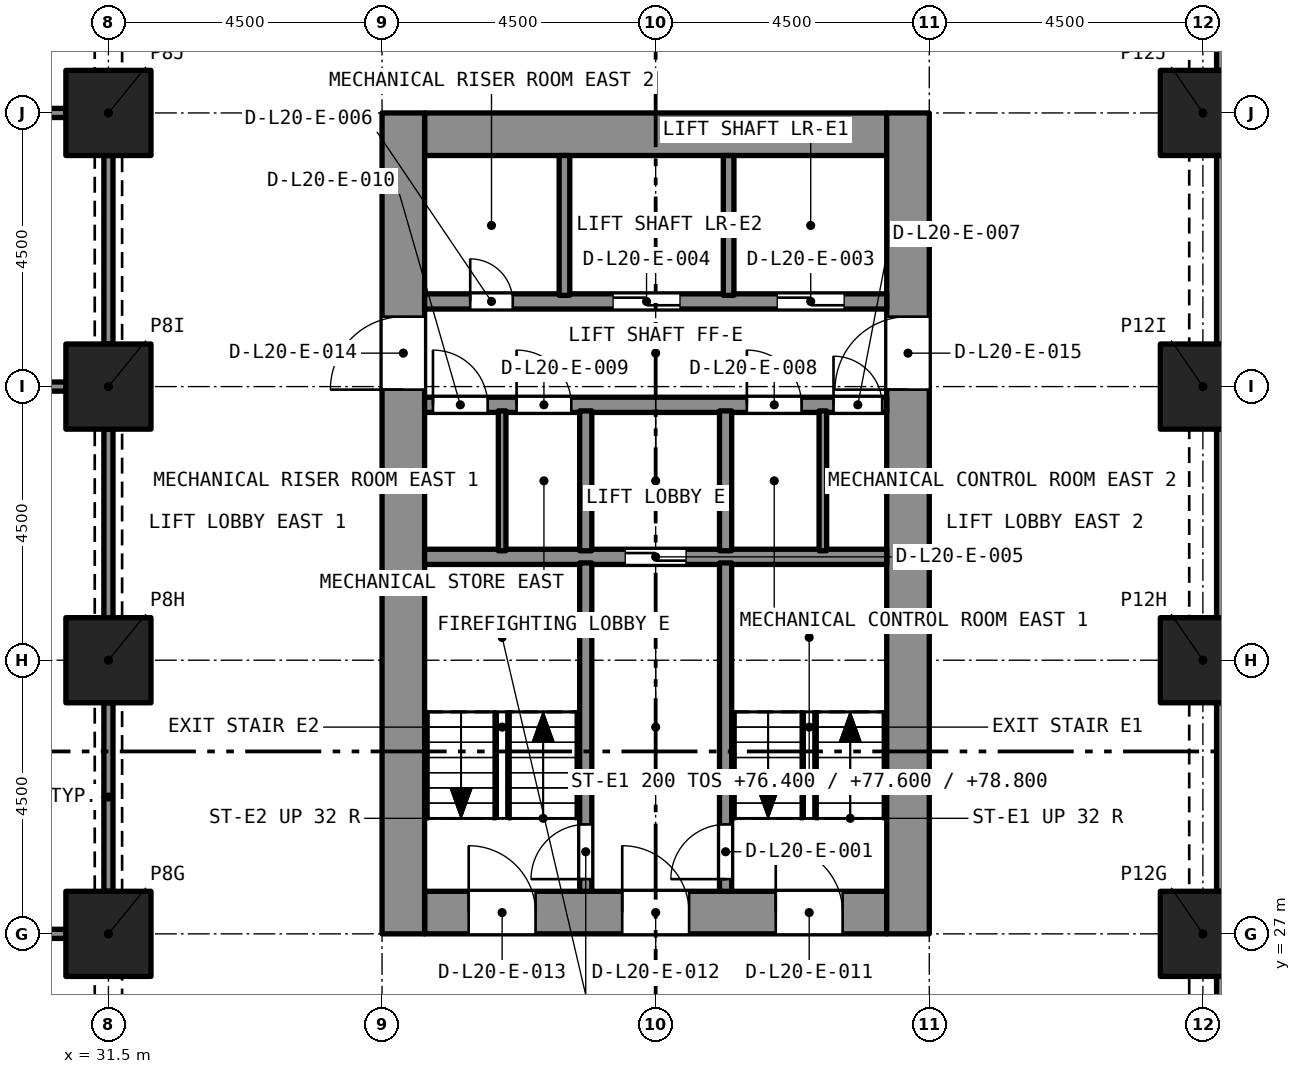
"""IFC4 building model, lengths in metres.
Left out: names, types, materials, properties, quantities, classifications, styles, units other than length and angle.
Written with IfcOpenShell. Run it as: python <this file> out.ifc"""

import sys

from ifc_helpers import new_model, si_unit, direction, frame, frame_2d, origin, origin_2d, place, context, subcontext, project, spatial, rectangle, extrude, element, fill, save


model = new_model("IFC4")
c1 = context("Model", 3, precision=1e-05, world=origin(), true_north=direction((0.0, 1.0)))
c2 = subcontext(c1, "Body", "Model", "MODEL_VIEW")
j1 = project(units=[si_unit("LENGTHUNIT", "METRE"), si_unit("PLANEANGLEUNIT", "RADIAN")], contexts=[c1])
p1 = place(None, origin())
s1 = spatial("IfcSite", under=j1, at=p1, CompositionType="ELEMENT")
p2 = place(p1, origin())
s2 = spatial("IfcBuilding", under=s1, at=p2, CompositionType="ELEMENT")
p3 = place(p2, frame((0.0, 0.0, 75.2)))
s3 = spatial("IfcBuildingStorey", under=s2, at=p3, CompositionType="ELEMENT", Elevation=75.2)
for number, where, z_axis, x_axis in (
    (1, (31.5, 27.0, 0.0), (0.0, 0.0, 1.0), (1.0, 0.0, 0.0)),
    (2, (49.5, 27.0, 0.0), (0.0, 0.0, 1.0), (1.0, 0.0, 0.0)),
    (3, (31.5, 31.5, 0.0), (0.0, 0.0, 1.0), (1.0, 0.0, 0.0)),
    (4, (49.5, 31.5, 0.0), (0.0, 0.0, 1.0), (1.0, 0.0, 0.0)),
    (5, (31.5, 36.0, 0.0), (0.0, 0.0, 1.0), (1.0, 0.0, 0.0)),
    (6, (49.5, 36.0, 0.0), (0.0, 0.0, 1.0), (1.0, 0.0, 0.0)),
    (7, (31.5, 40.5, 0.0), (0.0, 0.0, 1.0), (1.0, 0.0, 0.0)),
    (8, (49.5, 40.5, 0.0), (0.0, 0.0, 1.0), (1.0, 0.0, 0.0)),
):
    element("IfcColumn", number, at=place(p3, frame(where, z_axis=z_axis, x_axis=x_axis)), inside=s3, PredefinedType="COLUMN", context=c2, shape_type="SweptSolid", body=[
        extrude(rectangle(XDim=1.4, YDim=1.4, at=origin_2d()), origin(), (0.0, 0.0, 1.0), 4.8),
    ])
p4 = place(p3, frame((36.7, 27.35, 0.0), z_axis=(0.0, 0.0, 1.0), x_axis=(1.0, 0.0, 0.0)))
e9 = element("IfcWall", 9, at=p4, inside=s3, PredefinedType="SOLIDWALL", context=c2, shape_type="SweptSolid", body=[
    extrude(rectangle(XDim=7.6, YDim=0.7, at=frame_2d((3.8, 0.0))), origin(), (0.0, 0.0, 1.0), 4.8),
])
p5 = place(p4, frame((5.775, 0.0, 0.0)))
e10 = element("IfcOpeningElement", 10, at=p5, cuts=e9, PredefinedType="OPENING", context=c2, shape_type="SweptSolid", body=[
    extrude(rectangle(XDim=1.1, YDim=2.1, at=frame_2d((0.55, 1.05))), frame((0.0, 0.36, 0.0), z_axis=(0.0, -1.0, 0.0), x_axis=(1.0, 0.0, 0.0)), (0.0, 0.0, 1.0), 0.72),
])
p6 = place(p4, frame((3.25, 0.0, 0.0)))
e11 = element("IfcOpeningElement", 11, at=p6, cuts=e9, PredefinedType="OPENING", context=c2, shape_type="SweptSolid", body=[
    extrude(rectangle(XDim=1.1, YDim=2.1, at=frame_2d((0.55, 1.05))), frame((0.0, 0.36, 0.0), z_axis=(0.0, -1.0, 0.0), x_axis=(1.0, 0.0, 0.0)), (0.0, 0.0, 1.0), 0.72),
])
p7 = place(p4, frame((0.725, 0.0, 0.0)))
e12 = element("IfcOpeningElement", 12, at=p7, cuts=e9, PredefinedType="OPENING", context=c2, shape_type="SweptSolid", body=[
    extrude(rectangle(XDim=1.1, YDim=2.1, at=frame_2d((0.55, 1.05))), frame((0.0, 0.36, 0.0), z_axis=(0.0, -1.0, 0.0), x_axis=(1.0, 0.0, 0.0)), (0.0, 0.0, 1.0), 0.72),
])
p8 = place(p3, frame((36.7, 40.15, 0.0), z_axis=(0.0, 0.0, 1.0), x_axis=(1.0, 0.0, 0.0)))
e13 = element("IfcWall", 13, at=p8, inside=s3, PredefinedType="SOLIDWALL", context=c2, shape_type="SweptSolid", body=[
    extrude(rectangle(XDim=7.6, YDim=0.7, at=frame_2d((3.8, 0.0))), origin(), (0.0, 0.0, 1.0), 4.8),
])
p9 = place(p3, frame((36.35, 27.0, 0.0), z_axis=(0.0, 0.0, 1.0), x_axis=(0.0, 1.0, 0.0)))
e14 = element("IfcWall", 14, at=p9, inside=s3, PredefinedType="SOLIDWALL", context=c2, shape_type="SweptSolid", body=[
    extrude(rectangle(XDim=13.5, YDim=0.7, at=frame_2d((6.75, 0.0))), origin(), (0.0, 0.0, 1.0), 4.8),
])
p10 = place(p9, frame((8.95, 0.0, 0.0)))
e15 = element("IfcOpeningElement", 15, at=p10, cuts=e14, PredefinedType="OPENING", context=c2, shape_type="SweptSolid", body=[
    extrude(rectangle(XDim=1.2, YDim=2.1, at=frame_2d((0.6, 1.05))), frame((0.0, 0.36, 0.0), z_axis=(0.0, -1.0, 0.0), x_axis=(1.0, 0.0, 0.0)), (0.0, 0.0, 1.0), 0.72),
])
p11 = place(p3, frame((44.65, 27.0, 0.0), z_axis=(0.0, 0.0, 1.0), x_axis=(0.0, 1.0, 0.0)))
e16 = element("IfcWall", 16, at=p11, inside=s3, PredefinedType="SOLIDWALL", context=c2, shape_type="SweptSolid", body=[
    extrude(rectangle(XDim=13.5, YDim=0.7, at=frame_2d((6.75, 0.0))), origin(), (0.0, 0.0, 1.0), 4.8),
])
p12 = place(p11, frame((8.95, 0.0, 0.0)))
e17 = element("IfcOpeningElement", 17, at=p12, cuts=e16, PredefinedType="OPENING", context=c2, shape_type="SweptSolid", body=[
    extrude(rectangle(XDim=1.2, YDim=2.1, at=frame_2d((0.6, 1.05))), frame((0.0, 0.36, 0.0), z_axis=(0.0, -1.0, 0.0), x_axis=(1.0, 0.0, 0.0)), (0.0, 0.0, 1.0), 0.72),
])
for number, where, z_axis, x_axis in (
    (18, (49.875, 26.3, 0.0), (0.0, 0.0, 1.0), (0.0, -1.0, 0.0)),
    (19, (49.875, 30.8, 0.0), (0.0, 0.0, 1.0), (0.0, -1.0, 0.0)),
    (20, (49.875, 35.3, 0.0), (0.0, 0.0, 1.0), (0.0, -1.0, 0.0)),
    (21, (49.875, 39.8, 0.0), (0.0, 0.0, 1.0), (0.0, -1.0, 0.0)),
    (22, (49.875, 44.3, 0.0), (0.0, 0.0, 1.0), (0.0, -1.0, 0.0)),
):
    element("IfcWall", number, at=place(p3, frame(where, z_axis=z_axis, x_axis=x_axis)), inside=s3, PredefinedType="SOLIDWALL", context=c2, shape_type="SweptSolid", body=[
        extrude(rectangle(XDim=3.1, YDim=0.3, at=frame_2d((1.55, 0.0))), origin(), (0.0, 0.0, 1.0), 4.8),
    ])
p13 = place(p3, frame((36.7, 33.2, 0.0), z_axis=(0.0, 0.0, 1.0), x_axis=(1.0, 0.0, 0.0)))
e23 = element("IfcWall", 23, at=p13, inside=s3, PredefinedType="SOLIDWALL", context=c2, shape_type="SweptSolid", body=[
    extrude(rectangle(XDim=7.6, YDim=0.25, at=frame_2d((3.8, 0.0))), origin(), (0.0, 0.0, 1.0), 4.5),
])
p14 = place(p13, frame((3.3, 0.0, 0.0)))
e24 = element("IfcOpeningElement", 24, at=p14, cuts=e23, PredefinedType="OPENING", context=c2, shape_type="SweptSolid", body=[
    extrude(rectangle(XDim=1.0, YDim=2.1, at=frame_2d((0.5, 1.05))), frame((0.0, 0.135, 0.0), z_axis=(0.0, -1.0, 0.0), x_axis=(1.0, 0.0, 0.0)), (0.0, 0.0, 1.0), 0.27),
])
p15 = place(p3, frame((36.7, 35.7, 0.0), z_axis=(0.0, 0.0, 1.0), x_axis=(1.0, 0.0, 0.0)))
e25 = element("IfcWall", 25, at=p15, inside=s3, PredefinedType="SOLIDWALL", context=c2, shape_type="SweptSolid", body=[
    extrude(rectangle(XDim=7.6, YDim=0.25, at=frame_2d((3.8, 0.0))), origin(), (0.0, 0.0, 1.0), 4.5),
])
p16 = place(p15, frame((6.725, 0.0, 0.0)))
e26 = element("IfcOpeningElement", 26, at=p16, cuts=e25, PredefinedType="OPENING", context=c2, shape_type="SweptSolid", body=[
    extrude(rectangle(XDim=0.8, YDim=2.1, at=frame_2d((0.4, 1.05))), frame((0.0, 0.135, 0.0), z_axis=(0.0, -1.0, 0.0), x_axis=(1.0, 0.0, 0.0)), (0.0, 0.0, 1.0), 0.27),
])
p17 = place(p15, frame((5.3, 0.0, 0.0)))
e27 = element("IfcOpeningElement", 27, at=p17, cuts=e25, PredefinedType="OPENING", context=c2, shape_type="SweptSolid", body=[
    extrude(rectangle(XDim=0.9, YDim=2.1, at=frame_2d((0.45, 1.05))), frame((0.0, 0.135, 0.0), z_axis=(0.0, -1.0, 0.0), x_axis=(1.0, 0.0, 0.0)), (0.0, 0.0, 1.0), 0.27),
])
p18 = place(p15, frame((1.512, 0.0, 0.0)))
e28 = element("IfcOpeningElement", 28, at=p18, cuts=e25, PredefinedType="OPENING", context=c2, shape_type="SweptSolid", body=[
    extrude(rectangle(XDim=0.9, YDim=2.1, at=frame_2d((0.45, 1.05))), frame((0.0, 0.135, 0.0), z_axis=(0.0, -1.0, 0.0), x_axis=(1.0, 0.0, 0.0)), (0.0, 0.0, 1.0), 0.27),
])
p19 = place(p15, frame((0.137, 0.0, 0.0)))
e29 = element("IfcOpeningElement", 29, at=p19, cuts=e25, PredefinedType="OPENING", context=c2, shape_type="SweptSolid", body=[
    extrude(rectangle(XDim=0.9, YDim=2.1, at=frame_2d((0.45, 1.05))), frame((0.0, 0.135, 0.0), z_axis=(0.0, -1.0, 0.0), x_axis=(1.0, 0.0, 0.0)), (0.0, 0.0, 1.0), 0.27),
])
p20 = place(p3, frame((36.7, 37.4, 0.0), z_axis=(0.0, 0.0, 1.0), x_axis=(1.0, 0.0, 0.0)))
e30 = element("IfcWall", 30, at=p20, inside=s3, PredefinedType="SOLIDWALL", context=c2, shape_type="SweptSolid", body=[
    extrude(rectangle(XDim=7.6, YDim=0.25, at=frame_2d((3.8, 0.0))), origin(), (0.0, 0.0, 1.0), 4.5),
])
p21 = place(p20, frame((5.8, 0.0, 0.0)))
e31 = element("IfcOpeningElement", 31, at=p21, cuts=e30, PredefinedType="OPENING", context=c2, shape_type="SweptSolid", body=[
    extrude(rectangle(XDim=1.1, YDim=2.4, at=frame_2d((0.55, 1.2))), frame((0.0, 0.135, 0.0), z_axis=(0.0, -1.0, 0.0), x_axis=(1.0, 0.0, 0.0)), (0.0, 0.0, 1.0), 0.27),
])
p22 = place(p20, frame((3.1, 0.0, 0.0)))
e32 = element("IfcOpeningElement", 32, at=p22, cuts=e30, PredefinedType="OPENING", context=c2, shape_type="SweptSolid", body=[
    extrude(rectangle(XDim=1.1, YDim=2.4, at=frame_2d((0.55, 1.2))), frame((0.0, 0.135, 0.0), z_axis=(0.0, -1.0, 0.0), x_axis=(1.0, 0.0, 0.0)), (0.0, 0.0, 1.0), 0.27),
])
p23 = place(p20, frame((0.75, 0.0, 0.0)))
e33 = element("IfcOpeningElement", 33, at=p23, cuts=e30, PredefinedType="OPENING", context=c2, shape_type="SweptSolid", body=[
    extrude(rectangle(XDim=0.7, YDim=2.1, at=frame_2d((0.35, 1.05))), frame((0.0, 0.135, 0.0), z_axis=(0.0, -1.0, 0.0), x_axis=(1.0, 0.0, 0.0)), (0.0, 0.0, 1.0), 0.27),
])
p24 = place(p3, frame((41.65, 27.7, 0.0), z_axis=(0.0, 0.0, 1.0), x_axis=(0.0, 1.0, 0.0)))
e34 = element("IfcWall", 34, at=p24, inside=s3, PredefinedType="SOLIDWALL", context=c2, shape_type="SweptSolid", body=[
    extrude(rectangle(XDim=5.4, YDim=0.2, at=frame_2d((2.7, 0.0))), origin(), (0.0, 0.0, 1.0), 4.5),
])
p25 = place(p24, frame((0.2, 0.0, 0.0)))
e35 = element("IfcOpeningElement", 35, at=p25, cuts=e34, PredefinedType="OPENING", context=c2, shape_type="SweptSolid", body=[
    extrude(rectangle(XDim=0.9, YDim=2.1, at=frame_2d((0.45, 1.05))), frame((0.0, 0.11, 0.0), z_axis=(0.0, -1.0, 0.0), x_axis=(1.0, 0.0, 0.0)), (0.0, 0.0, 1.0), 0.22),
])
p26 = place(p3, frame((39.35, 27.7, 0.0), z_axis=(0.0, 0.0, 1.0), x_axis=(0.0, 1.0, 0.0)))
e36 = element("IfcWall", 36, at=p26, inside=s3, PredefinedType="SOLIDWALL", context=c2, shape_type="SweptSolid", body=[
    extrude(rectangle(XDim=5.4, YDim=0.2, at=frame_2d((2.7, 0.0))), origin(), (0.0, 0.0, 1.0), 4.5),
])
p27 = place(p26, frame((0.2, 0.0, 0.0)))
e37 = element("IfcOpeningElement", 37, at=p27, cuts=e36, PredefinedType="OPENING", context=c2, shape_type="SweptSolid", body=[
    extrude(rectangle(XDim=0.9, YDim=2.1, at=frame_2d((0.45, 1.05))), frame((0.0, 0.11, 0.0), z_axis=(0.0, -1.0, 0.0), x_axis=(1.0, 0.0, 0.0)), (0.0, 0.0, 1.0), 0.22),
])
for number, where, z_axis, x_axis in (
    (38, (41.65, 33.3, 0.0), (0.0, 0.0, 1.0), (0.0, 1.0, 0.0)),
    (39, (39.35, 33.3, 0.0), (0.0, 0.0, 1.0), (0.0, 1.0, 0.0)),
):
    element("IfcWall", number, at=place(p3, frame(where, z_axis=z_axis, x_axis=x_axis)), inside=s3, PredefinedType="SOLIDWALL", context=c2, shape_type="SweptSolid", body=[
        extrude(rectangle(XDim=2.3, YDim=0.2, at=frame_2d((1.15, 0.0))), origin(), (0.0, 0.0, 1.0), 4.5),
    ])
for number, where, z_axis, x_axis in (
    (40, (41.7, 37.5, 0.0), (0.0, 0.0, 1.0), (0.0, 1.0, 0.0)),
    (41, (39.0, 37.5, 0.0), (0.0, 0.0, 1.0), (0.0, 1.0, 0.0)),
):
    element("IfcWall", number, at=place(p3, frame(where, z_axis=z_axis, x_axis=x_axis)), inside=s3, PredefinedType="SOLIDWALL", context=c2, shape_type="SweptSolid", body=[
        extrude(rectangle(XDim=2.3, YDim=0.175, at=frame_2d((1.15, 0.0))), origin(), (0.0, 0.0, 1.0), 4.5),
    ])
for number, where, z_axis, x_axis in (
    (42, (43.25, 33.3, 0.0), (0.0, 0.0, 1.0), (0.0, 1.0, 0.0)),
    (43, (37.975, 33.3, 0.0), (0.0, 0.0, 1.0), (0.0, 1.0, 0.0)),
):
    element("IfcWall", number, at=place(p3, frame(where, z_axis=z_axis, x_axis=x_axis)), inside=s3, PredefinedType="PARTITIONING", context=c2, shape_type="SweptSolid", body=[
        extrude(rectangle(XDim=2.3, YDim=0.125, at=frame_2d((1.15, 0.0))), origin(), (0.0, 0.0, 1.0), 4.5),
    ])
p28 = place(p3, frame((18.7, 27.0, 0.0), z_axis=(0.0, 0.0, 1.0), x_axis=(1.0, 0.0, 0.0)))
e44 = element("IfcWall", 44, at=p28, inside=s3, PredefinedType="PARTITIONING", context=c2, shape_type="SweptSolid", body=[
    extrude(rectangle(XDim=12.1, YDim=0.15, at=frame_2d((6.05, 0.0))), origin(), (0.0, 0.0, 1.0), 4.35),
])
p29 = place(p28, frame((5.3, 0.0, 0.0)))
e45 = element("IfcOpeningElement", 45, at=p29, cuts=e44, PredefinedType="OPENING", context=c2, shape_type="SweptSolid", body=[
    extrude(rectangle(XDim=1.5, YDim=2.4, at=frame_2d((0.75, 1.2))), frame((0.0, 0.085, 0.0), z_axis=(0.0, -1.0, 0.0), x_axis=(1.0, 0.0, 0.0)), (0.0, 0.0, 1.0), 0.17),
])
p30 = place(p3, frame((18.7, 36.0, 0.0), z_axis=(0.0, 0.0, 1.0), x_axis=(1.0, 0.0, 0.0)))
e46 = element("IfcWall", 46, at=p30, inside=s3, PredefinedType="PARTITIONING", context=c2, shape_type="SweptSolid", body=[
    extrude(rectangle(XDim=12.1, YDim=0.15, at=frame_2d((6.05, 0.0))), origin(), (0.0, 0.0, 1.0), 4.35),
])
for number, where, z_axis, x_axis in (
    (47, (31.5, 32.2, 0.0), (0.0, 0.0, 1.0), (0.0, 1.0, 0.0)),
    (48, (31.5, 27.7, 0.0), (0.0, 0.0, 1.0), (0.0, 1.0, 0.0)),
):
    element("IfcWall", number, at=place(p3, frame(where, z_axis=z_axis, x_axis=x_axis)), inside=s3, PredefinedType="PARTITIONING", context=c2, shape_type="SweptSolid", body=[
        extrude(rectangle(XDim=3.1, YDim=0.15, at=frame_2d((1.55, 0.0))), origin(), (0.0, 0.0, 1.0), 3.98),
    ])
p31 = place(p3, frame((30.8, 40.5, 0.0), z_axis=(0.0, 0.0, 1.0), x_axis=(-1.0, 0.0, 0.0)))
e49 = element("IfcWall", 49, at=p31, inside=s3, PredefinedType="PARTITIONING", context=c2, shape_type="SweptSolid", body=[
    extrude(rectangle(XDim=12.1, YDim=0.15, at=frame_2d((6.05, 0.0))), origin(), (0.0, 0.0, 1.0), 4.35),
])
p32 = place(p31, frame((5.55, 0.0, 0.0)))
e50 = element("IfcOpeningElement", 50, at=p32, cuts=e49, PredefinedType="OPENING", context=c2, shape_type="SweptSolid", body=[
    extrude(rectangle(XDim=1.0, YDim=2.1, at=frame_2d((0.5, 1.05))), frame((0.0, 0.085, 0.0), z_axis=(0.0, -1.0, 0.0), x_axis=(1.0, 0.0, 0.0)), (0.0, 0.0, 1.0), 0.17),
])
p33 = place(p3, frame((31.5, 36.7, 0.0), z_axis=(0.0, 0.0, 1.0), x_axis=(0.0, 1.0, 0.0)))
e51 = element("IfcWall", 51, at=p33, inside=s3, PredefinedType="PARTITIONING", context=c2, shape_type="SweptSolid", body=[
    extrude(rectangle(XDim=3.1, YDim=0.15, at=frame_2d((1.55, 0.0))), origin(), (0.0, 0.0, 1.0), 3.98),
])
p34 = place(p25, origin())
e52 = element("IfcDoor", 52, at=p34, inside=s3, OperationType="SINGLE_SWING_LEFT", PredefinedType="DOOR", context=c2, shape_type="SweptSolid", body=[
    extrude(rectangle(XDim=0.9, YDim=2.1, at=frame_2d((0.45, 1.05))), frame((0.0, 0.025, 0.0), z_axis=(0.0, -1.0, 0.0), x_axis=(1.0, 0.0, 0.0)), (0.0, 0.0, 1.0), 0.05),
])
fill(e35, e52)
p35 = place(p27, origin())
e53 = element("IfcDoor", 53, at=p35, inside=s3, OperationType="SINGLE_SWING_LEFT", PredefinedType="DOOR", context=c2, shape_type="SweptSolid", body=[
    extrude(rectangle(XDim=0.9, YDim=2.1, at=frame_2d((0.45, 1.05))), frame((0.0, 0.025, 0.0), z_axis=(0.0, -1.0, 0.0), x_axis=(1.0, 0.0, 0.0)), (0.0, 0.0, 1.0), 0.05),
])
fill(e37, e53)
p36 = place(p21, origin())
e54 = element("IfcDoor", 54, at=p36, inside=s3, OperationType="SLIDING_TO_LEFT", PredefinedType="DOOR", context=c2, shape_type="SweptSolid", body=[
    extrude(rectangle(XDim=1.1, YDim=2.4, at=frame_2d((0.55, 1.2))), frame((0.0, 0.025, 0.0), z_axis=(0.0, -1.0, 0.0), x_axis=(1.0, 0.0, 0.0)), (0.0, 0.0, 1.0), 0.05),
])
fill(e31, e54)
p37 = place(p22, origin())
e55 = element("IfcDoor", 55, at=p37, inside=s3, OperationType="SLIDING_TO_LEFT", PredefinedType="DOOR", context=c2, shape_type="SweptSolid", body=[
    extrude(rectangle(XDim=1.1, YDim=2.4, at=frame_2d((0.55, 1.2))), frame((0.0, 0.025, 0.0), z_axis=(0.0, -1.0, 0.0), x_axis=(1.0, 0.0, 0.0)), (0.0, 0.0, 1.0), 0.05),
])
fill(e32, e55)
p38 = place(p14, origin())
e56 = element("IfcDoor", 56, at=p38, inside=s3, OperationType="SLIDING_TO_LEFT", PredefinedType="DOOR", context=c2, shape_type="SweptSolid", body=[
    extrude(rectangle(XDim=1.0, YDim=2.1, at=frame_2d((0.5, 1.05))), frame((0.0, 0.025, 0.0), z_axis=(0.0, -1.0, 0.0), x_axis=(1.0, 0.0, 0.0)), (0.0, 0.0, 1.0), 0.05),
])
fill(e24, e56)
p39 = place(p23, origin())
e57 = element("IfcDoor", 57, at=p39, inside=s3, OperationType="SINGLE_SWING_LEFT", PredefinedType="DOOR", context=c2, shape_type="SweptSolid", body=[
    extrude(rectangle(XDim=0.7, YDim=2.1, at=frame_2d((0.35, 1.05))), frame((0.0, 0.025, 0.0), z_axis=(0.0, -1.0, 0.0), x_axis=(1.0, 0.0, 0.0)), (0.0, 0.0, 1.0), 0.05),
])
fill(e33, e57)
p40 = place(p16, origin())
e58 = element("IfcDoor", 58, at=p40, inside=s3, OperationType="SINGLE_SWING_LEFT", PredefinedType="DOOR", context=c2, shape_type="SweptSolid", body=[
    extrude(rectangle(XDim=0.8, YDim=2.1, at=frame_2d((0.4, 1.05))), frame((0.0, 0.025, 0.0), z_axis=(0.0, -1.0, 0.0), x_axis=(1.0, 0.0, 0.0)), (0.0, 0.0, 1.0), 0.05),
])
fill(e26, e58)
p41 = place(p17, origin())
e59 = element("IfcDoor", 59, at=p41, inside=s3, OperationType="SINGLE_SWING_LEFT", PredefinedType="DOOR", context=c2, shape_type="SweptSolid", body=[
    extrude(rectangle(XDim=0.9, YDim=2.1, at=frame_2d((0.45, 1.05))), frame((0.0, 0.025, 0.0), z_axis=(0.0, -1.0, 0.0), x_axis=(1.0, 0.0, 0.0)), (0.0, 0.0, 1.0), 0.05),
])
fill(e27, e59)
p42 = place(p18, origin())
e60 = element("IfcDoor", 60, at=p42, inside=s3, OperationType="SINGLE_SWING_LEFT", PredefinedType="DOOR", context=c2, shape_type="SweptSolid", body=[
    extrude(rectangle(XDim=0.9, YDim=2.1, at=frame_2d((0.45, 1.05))), frame((0.0, 0.025, 0.0), z_axis=(0.0, -1.0, 0.0), x_axis=(1.0, 0.0, 0.0)), (0.0, 0.0, 1.0), 0.05),
])
fill(e28, e60)
p43 = place(p19, origin())
e61 = element("IfcDoor", 61, at=p43, inside=s3, OperationType="SINGLE_SWING_LEFT", PredefinedType="DOOR", context=c2, shape_type="SweptSolid", body=[
    extrude(rectangle(XDim=0.9, YDim=2.1, at=frame_2d((0.45, 1.05))), frame((0.0, 0.025, 0.0), z_axis=(0.0, -1.0, 0.0), x_axis=(1.0, 0.0, 0.0)), (0.0, 0.0, 1.0), 0.05),
])
fill(e29, e61)
p44 = place(p5, origin())
e62 = element("IfcDoor", 62, at=p44, inside=s3, OperationType="SINGLE_SWING_LEFT", PredefinedType="DOOR", context=c2, shape_type="SweptSolid", body=[
    extrude(rectangle(XDim=1.1, YDim=2.1, at=frame_2d((0.55, 1.05))), frame((0.0, 0.025, 0.0), z_axis=(0.0, -1.0, 0.0), x_axis=(1.0, 0.0, 0.0)), (0.0, 0.0, 1.0), 0.05),
])
fill(e10, e62)
p45 = place(p6, origin())
e63 = element("IfcDoor", 63, at=p45, inside=s3, OperationType="SINGLE_SWING_LEFT", PredefinedType="DOOR", context=c2, shape_type="SweptSolid", body=[
    extrude(rectangle(XDim=1.1, YDim=2.1, at=frame_2d((0.55, 1.05))), frame((0.0, 0.025, 0.0), z_axis=(0.0, -1.0, 0.0), x_axis=(1.0, 0.0, 0.0)), (0.0, 0.0, 1.0), 0.05),
])
fill(e11, e63)
p46 = place(p7, origin())
e64 = element("IfcDoor", 64, at=p46, inside=s3, OperationType="SINGLE_SWING_LEFT", PredefinedType="DOOR", context=c2, shape_type="SweptSolid", body=[
    extrude(rectangle(XDim=1.1, YDim=2.1, at=frame_2d((0.55, 1.05))), frame((0.0, 0.025, 0.0), z_axis=(0.0, -1.0, 0.0), x_axis=(1.0, 0.0, 0.0)), (0.0, 0.0, 1.0), 0.05),
])
fill(e12, e64)
p47 = place(p10, origin())
e65 = element("IfcDoor", 65, at=p47, inside=s3, OperationType="SINGLE_SWING_LEFT", PredefinedType="DOOR", context=c2, shape_type="SweptSolid", body=[
    extrude(rectangle(XDim=1.2, YDim=2.1, at=frame_2d((0.6, 1.05))), frame((0.0, 0.025, 0.0), z_axis=(0.0, -1.0, 0.0), x_axis=(1.0, 0.0, 0.0)), (0.0, 0.0, 1.0), 0.05),
])
fill(e15, e65)
p48 = place(p12, origin())
e66 = element("IfcDoor", 66, at=p48, inside=s3, OperationType="SINGLE_SWING_LEFT", PredefinedType="DOOR", context=c2, shape_type="SweptSolid", body=[
    extrude(rectangle(XDim=1.2, YDim=2.1, at=frame_2d((0.6, 1.05))), frame((0.0, 0.025, 0.0), z_axis=(0.0, -1.0, 0.0), x_axis=(1.0, 0.0, 0.0)), (0.0, 0.0, 1.0), 0.05),
])
fill(e17, e66)
save(model, sys.argv[1])
